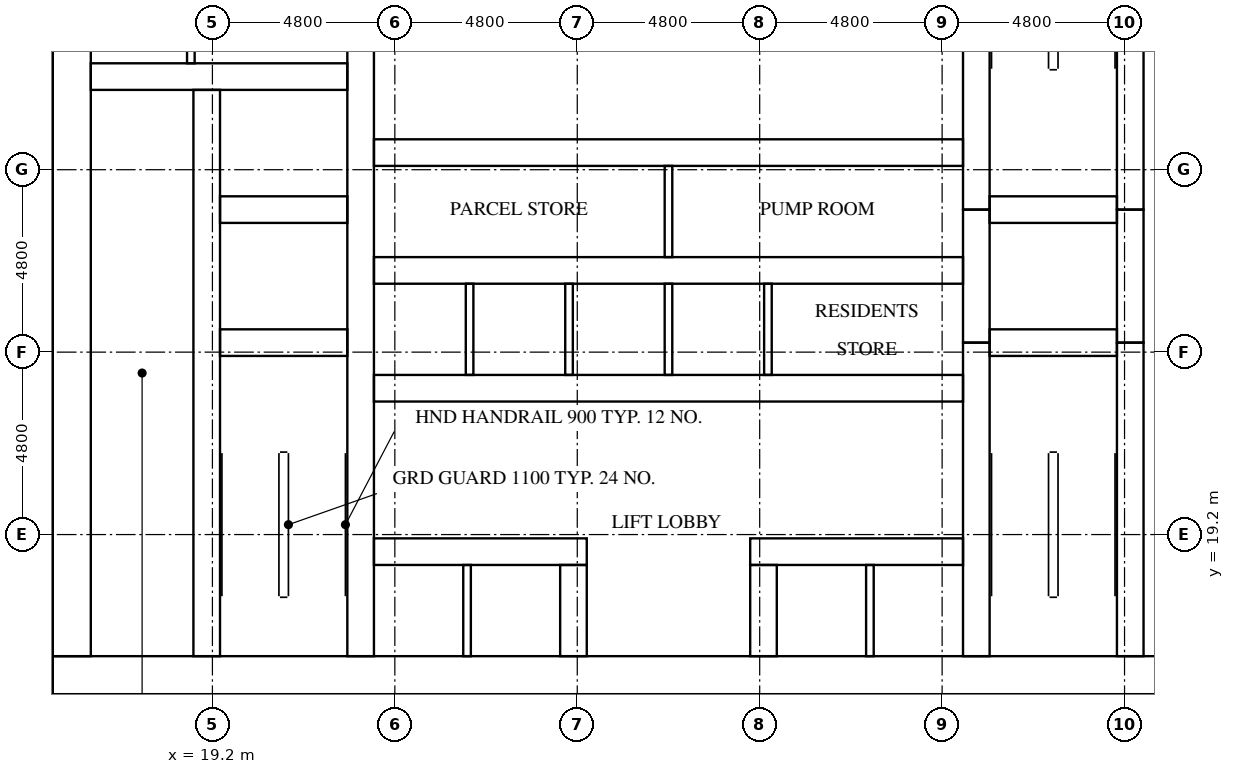
"""IFC4 building model, lengths in metres.
Left out: names, types, materials, properties, quantities, classifications, styles, units other than length and angle.
Written with IfcOpenShell. Run it as: python <this file> out.ifc"""

import sys

from ifc_helpers import new_model, si_unit, direction, frame, frame_2d, origin, place, context, subcontext, project, spatial, rectangle, extrude, element, fill, save


model = new_model("IFC4")
c1 = context("Model", 3, precision=1e-05, world=origin(), true_north=direction((0.0, 1.0)))
c2 = subcontext(c1, "Body", "Model", "MODEL_VIEW")
j1 = project(units=[si_unit("LENGTHUNIT", "METRE"), si_unit("PLANEANGLEUNIT", "RADIAN")], contexts=[c1])
p1 = place(None, origin())
s1 = spatial("IfcSite", under=j1, at=p1, CompositionType="ELEMENT")
p2 = place(p1, origin())
s2 = spatial("IfcBuilding", under=s1, at=p2, CompositionType="ELEMENT")
p3 = place(p2, frame((0.0, 0.0, 15.0)))
s3 = spatial("IfcBuildingStorey", under=s2, at=p3, CompositionType="ELEMENT", Elevation=15.0)
p4 = place(p3, frame((15.0, 15.5, 0.0), z_axis=(0.0, 0.0, 1.0), x_axis=(1.0, 0.0, 0.0)))
e1 = element("IfcWall", 1, at=p4, inside=s3, PredefinedType="SHEAR", context=c2, shape_type="SweptSolid", body=[
    extrude(rectangle(XDim=32.4, YDim=1.0, at=frame_2d((16.2, 0.0))), origin(), (0.0, 0.0, 1.0), 4.2),
])
p5 = place(p4, frame((15.3, 0.0, 0.0)))
e2 = element("IfcOpeningElement", 2, at=p5, cuts=e1, PredefinedType="OPENING", context=c2, shape_type="SweptSolid", body=[
    extrude(rectangle(XDim=1.8, YDim=2.1, at=frame_2d((0.9, 1.05))), frame((0.0, 0.51, 0.0), z_axis=(0.0, -1.0, 0.0), x_axis=(1.0, 0.0, 0.0)), (0.0, 0.0, 1.0), 1.02),
])
p6 = place(p3, frame((15.5, 16.0, 0.0), z_axis=(0.0, 0.0, 1.0), x_axis=(0.0, 1.0, 0.0)))
e3 = element("IfcWall", 3, at=p6, inside=s3, PredefinedType="SHEAR", context=c2, shape_type="SweptSolid", body=[
    extrude(rectangle(XDim=20.8, YDim=1.0, at=frame_2d((10.4, 0.0))), origin(), (0.0, 0.0, 1.0), 4.2),
])
p7 = place(p6, frame((4.76, 0.0, 0.0)))
e4 = element("IfcOpeningElement", 4, at=p7, cuts=e3, PredefinedType="OPENING", context=c2, shape_type="SweptSolid", body=[
    extrude(rectangle(XDim=1.2, YDim=2.1, at=frame_2d((0.6, 1.05))), frame((0.0, 0.51, 0.0), z_axis=(0.0, -1.0, 0.0), x_axis=(1.0, 0.0, 0.0)), (0.0, 0.0, 1.0), 1.02),
])
p8 = place(p3, frame((19.05, 16.0, 0.0), z_axis=(0.0, 0.0, 1.0), x_axis=(0.0, 1.0, 0.0)))
e5 = element("IfcWall", 5, at=p8, inside=s3, PredefinedType="SHEAR", context=c2, shape_type="SweptSolid", body=[
    extrude(rectangle(XDim=14.9, YDim=0.7, at=frame_2d((7.45, 0.0))), origin(), (0.0, 0.0, 1.0), 4.2),
])
p9 = place(p8, frame((9.45, 0.0, 0.0)))
e6 = element("IfcOpeningElement", 6, at=p9, cuts=e5, PredefinedType="OPENING", context=c2, shape_type="SweptSolid", body=[
    extrude(rectangle(XDim=1.1, YDim=2.1, at=frame_2d((0.55, 1.05))), frame((0.0, 0.36, 0.0), z_axis=(0.0, -1.0, 0.0), x_axis=(1.0, 0.0, 0.0)), (0.0, 0.0, 1.0), 0.72),
])
p10 = place(p8, frame((12.95, 0.0, 0.0)))
e7 = element("IfcOpeningElement", 7, at=p10, cuts=e5, PredefinedType="OPENING", context=c2, shape_type="SweptSolid", body=[
    extrude(rectangle(XDim=1.1, YDim=2.1, at=frame_2d((0.55, 1.05))), frame((0.0, 0.36, 0.0), z_axis=(0.0, -1.0, 0.0), x_axis=(1.0, 0.0, 0.0)), (0.0, 0.0, 1.0), 0.72),
])
p11 = place(p8, frame((0.2, 0.0, 0.0)))
e8 = element("IfcOpeningElement", 8, at=p11, cuts=e5, PredefinedType="OPENING", context=c2, shape_type="SweptSolid", body=[
    extrude(rectangle(XDim=1.2, YDim=2.1, at=frame_2d((0.6, 1.05))), frame((0.0, 0.36, 0.0), z_axis=(0.0, -1.0, 0.0), x_axis=(1.0, 0.0, 0.0)), (0.0, 0.0, 1.0), 0.72),
])
p12 = place(p3, frame((23.1, 16.0, 0.0), z_axis=(0.0, 0.0, 1.0), x_axis=(0.0, 1.0, 0.0)))
e9 = element("IfcWall", 9, at=p12, inside=s3, PredefinedType="SHEAR", context=c2, shape_type="SweptSolid", body=[
    extrude(rectangle(XDim=20.8, YDim=0.7, at=frame_2d((10.4, 0.0))), origin(), (0.0, 0.0, 1.0), 4.2),
])
p13 = place(p3, frame((39.3, 16.0, 0.0), z_axis=(0.0, 0.0, 1.0), x_axis=(0.0, 1.0, 0.0)))
e10 = element("IfcWall", 10, at=p13, inside=s3, PredefinedType="SHEAR", context=c2, shape_type="SweptSolid", body=[
    extrude(rectangle(XDim=8.25, YDim=0.7, at=frame_2d((4.125, 0.0))), origin(), (0.0, 0.0, 1.0), 4.2),
])
p14 = place(p3, frame((39.3, 24.25, 0.0), z_axis=(0.0, 0.0, 1.0), x_axis=(0.0, 1.0, 0.0)))
e11 = element("IfcWall", 11, at=p14, inside=s3, PredefinedType="SHEAR", context=c2, shape_type="SweptSolid", body=[
    extrude(rectangle(XDim=3.5, YDim=0.7, at=frame_2d((1.75, 0.0))), origin(), (0.0, 0.0, 1.0), 4.2),
])
p15 = place(p3, frame((39.3, 27.75, 0.0), z_axis=(0.0, 0.0, 1.0), x_axis=(0.0, 1.0, 0.0)))
e12 = element("IfcWall", 12, at=p15, inside=s3, PredefinedType="SHEAR", context=c2, shape_type="SweptSolid", body=[
    extrude(rectangle(XDim=9.05, YDim=0.7, at=frame_2d((4.525, 0.0))), origin(), (0.0, 0.0, 1.0), 4.2),
])
p16 = place(p3, frame((43.35, 16.0, 0.0), z_axis=(0.0, 0.0, 1.0), x_axis=(0.0, 1.0, 0.0)))
e13 = element("IfcWall", 13, at=p16, inside=s3, PredefinedType="SHEAR", context=c2, shape_type="SweptSolid", body=[
    extrude(rectangle(XDim=8.25, YDim=0.7, at=frame_2d((4.125, 0.0))), origin(), (0.0, 0.0, 1.0), 4.2),
])
p17 = place(p16, frame((0.2, 0.0, 0.0)))
e14 = element("IfcOpeningElement", 14, at=p17, cuts=e13, PredefinedType="OPENING", context=c2, shape_type="SweptSolid", body=[
    extrude(rectangle(XDim=1.2, YDim=2.1, at=frame_2d((0.6, 1.05))), frame((0.0, 0.36, 0.0), z_axis=(0.0, -1.0, 0.0), x_axis=(1.0, 0.0, 0.0)), (0.0, 0.0, 1.0), 0.72),
])
p18 = place(p3, frame((43.35, 24.25, 0.0), z_axis=(0.0, 0.0, 1.0), x_axis=(0.0, 1.0, 0.0)))
e15 = element("IfcWall", 15, at=p18, inside=s3, PredefinedType="SHEAR", context=c2, shape_type="SweptSolid", body=[
    extrude(rectangle(XDim=3.5, YDim=0.7, at=frame_2d((1.75, 0.0))), origin(), (0.0, 0.0, 1.0), 4.2),
])
p19 = place(p18, frame((1.2, 0.0, 0.0)))
e16 = element("IfcOpeningElement", 16, at=p19, cuts=e15, PredefinedType="OPENING", context=c2, shape_type="SweptSolid", body=[
    extrude(rectangle(XDim=1.1, YDim=2.1, at=frame_2d((0.55, 1.05))), frame((0.0, 0.36, 0.0), z_axis=(0.0, -1.0, 0.0), x_axis=(1.0, 0.0, 0.0)), (0.0, 0.0, 1.0), 0.72),
])
p20 = place(p3, frame((43.35, 27.75, 0.0), z_axis=(0.0, 0.0, 1.0), x_axis=(0.0, 1.0, 0.0)))
e17 = element("IfcWall", 17, at=p20, inside=s3, PredefinedType="SHEAR", context=c2, shape_type="SweptSolid", body=[
    extrude(rectangle(XDim=9.05, YDim=0.7, at=frame_2d((4.525, 0.0))), origin(), (0.0, 0.0, 1.0), 4.2),
])
p21 = place(p20, frame((7.65, 0.0, 0.0)))
e18 = element("IfcOpeningElement", 18, at=p21, cuts=e17, PredefinedType="OPENING", context=c2, shape_type="SweptSolid", body=[
    extrude(rectangle(XDim=1.2, YDim=2.1, at=frame_2d((0.6, 1.05))), frame((0.0, 0.36, 0.0), z_axis=(0.0, -1.0, 0.0), x_axis=(1.0, 0.0, 0.0)), (0.0, 0.0, 1.0), 0.72),
])
for number, where, z_axis, x_axis in (
    (19, (19.4, 24.25, 0.0), (0.0, 0.0, 1.0), (1.0, 0.0, 0.0)),
    (20, (19.4, 27.75, 0.0), (0.0, 0.0, 1.0), (1.0, 0.0, 0.0)),
):
    element("IfcWall", number, at=place(p3, frame(where, z_axis=z_axis, x_axis=x_axis)), inside=s3, PredefinedType="SHEAR", context=c2, shape_type="SweptSolid", body=[
        extrude(rectangle(XDim=3.35, YDim=0.7, at=frame_2d((1.675, 0.0))), origin(), (0.0, 0.0, 1.0), 4.2),
    ])
p22 = place(p3, frame((16.0, 31.25, 0.0), z_axis=(0.0, 0.0, 1.0), x_axis=(1.0, 0.0, 0.0)))
e21 = element("IfcWall", 21, at=p22, inside=s3, PredefinedType="SHEAR", context=c2, shape_type="SweptSolid", body=[
    extrude(rectangle(XDim=6.75, YDim=0.7, at=frame_2d((3.375, 0.0))), origin(), (0.0, 0.0, 1.0), 4.2),
])
for number, where, z_axis, x_axis in (
    (22, (39.65, 24.25, 0.0), (0.0, 0.0, 1.0), (1.0, 0.0, 0.0)),
    (23, (39.65, 27.75, 0.0), (0.0, 0.0, 1.0), (1.0, 0.0, 0.0)),
):
    element("IfcWall", number, at=place(p3, frame(where, z_axis=z_axis, x_axis=x_axis)), inside=s3, PredefinedType="SHEAR", context=c2, shape_type="SweptSolid", body=[
        extrude(rectangle(XDim=3.35, YDim=0.7, at=frame_2d((1.675, 0.0))), origin(), (0.0, 0.0, 1.0), 4.2),
    ])
p23 = place(p3, frame((23.45, 18.75, 0.0), z_axis=(0.0, 0.0, 1.0), x_axis=(1.0, 0.0, 0.0)))
e24 = element("IfcWall", 24, at=p23, inside=s3, PredefinedType="SHEAR", context=c2, shape_type="SweptSolid", body=[
    extrude(rectangle(XDim=5.6, YDim=0.7, at=frame_2d((2.8, 0.0))), origin(), (0.0, 0.0, 1.0), 4.2),
])
p24 = place(p23, frame((0.625, 0.0, 0.0)))
e25 = element("IfcOpeningElement", 25, at=p24, cuts=e24, PredefinedType="OPENING", context=c2, shape_type="SweptSolid", body=[
    extrude(rectangle(XDim=1.1, YDim=2.1, at=frame_2d((0.55, 1.05))), frame((0.0, 0.36, 0.0), z_axis=(0.0, -1.0, 0.0), x_axis=(1.0, 0.0, 0.0)), (0.0, 0.0, 1.0), 0.72),
])
p25 = place(p23, frame((3.175, 0.0, 0.0)))
e26 = element("IfcOpeningElement", 26, at=p25, cuts=e24, PredefinedType="OPENING", context=c2, shape_type="SweptSolid", body=[
    extrude(rectangle(XDim=1.1, YDim=2.1, at=frame_2d((0.55, 1.05))), frame((0.0, 0.36, 0.0), z_axis=(0.0, -1.0, 0.0), x_axis=(1.0, 0.0, 0.0)), (0.0, 0.0, 1.0), 0.72),
])
p26 = place(p3, frame((33.35, 18.75, 0.0), z_axis=(0.0, 0.0, 1.0), x_axis=(1.0, 0.0, 0.0)))
e27 = element("IfcWall", 27, at=p26, inside=s3, PredefinedType="SHEAR", context=c2, shape_type="SweptSolid", body=[
    extrude(rectangle(XDim=5.6, YDim=0.7, at=frame_2d((2.8, 0.0))), origin(), (0.0, 0.0, 1.0), 4.2),
])
p27 = place(p26, frame((1.325, 0.0, 0.0)))
e28 = element("IfcOpeningElement", 28, at=p27, cuts=e27, PredefinedType="OPENING", context=c2, shape_type="SweptSolid", body=[
    extrude(rectangle(XDim=1.1, YDim=2.1, at=frame_2d((0.55, 1.05))), frame((0.0, 0.36, 0.0), z_axis=(0.0, -1.0, 0.0), x_axis=(1.0, 0.0, 0.0)), (0.0, 0.0, 1.0), 0.72),
])
p28 = place(p26, frame((3.875, 0.0, 0.0)))
e29 = element("IfcOpeningElement", 29, at=p28, cuts=e27, PredefinedType="OPENING", context=c2, shape_type="SweptSolid", body=[
    extrude(rectangle(XDim=1.1, YDim=2.1, at=frame_2d((0.55, 1.05))), frame((0.0, 0.36, 0.0), z_axis=(0.0, -1.0, 0.0), x_axis=(1.0, 0.0, 0.0)), (0.0, 0.0, 1.0), 0.72),
])
p29 = place(p3, frame((23.45, 23.05, 0.0), z_axis=(0.0, 0.0, 1.0), x_axis=(1.0, 0.0, 0.0)))
e30 = element("IfcWall", 30, at=p29, inside=s3, PredefinedType="SHEAR", context=c2, shape_type="SweptSolid", body=[
    extrude(rectangle(XDim=15.5, YDim=0.7, at=frame_2d((7.75, 0.0))), origin(), (0.0, 0.0, 1.0), 4.2),
])
p30 = place(p29, frame((0.658, 0.0, 0.0)))
e31 = element("IfcOpeningElement", 31, at=p30, cuts=e30, PredefinedType="OPENING", context=c2, shape_type="SweptSolid", body=[
    extrude(rectangle(XDim=1.1, YDim=2.1, at=frame_2d((0.55, 1.05))), frame((0.0, 0.36, 0.0), z_axis=(0.0, -1.0, 0.0), x_axis=(1.0, 0.0, 0.0)), (0.0, 0.0, 1.0), 0.72),
])
p31 = place(p29, frame((3.275, 0.0, 0.0)))
e32 = element("IfcOpeningElement", 32, at=p31, cuts=e30, PredefinedType="OPENING", context=c2, shape_type="SweptSolid", body=[
    extrude(rectangle(XDim=1.1, YDim=2.1, at=frame_2d((0.55, 1.05))), frame((0.0, 0.36, 0.0), z_axis=(0.0, -1.0, 0.0), x_axis=(1.0, 0.0, 0.0)), (0.0, 0.0, 1.0), 0.72),
])
p32 = place(p29, frame((12.483, 0.0, 0.0)))
e33 = element("IfcOpeningElement", 33, at=p32, cuts=e30, PredefinedType="OPENING", context=c2, shape_type="SweptSolid", body=[
    extrude(rectangle(XDim=1.0, YDim=2.1, at=frame_2d((0.5, 1.05))), frame((0.0, 0.36, 0.0), z_axis=(0.0, -1.0, 0.0), x_axis=(1.0, 0.0, 0.0)), (0.0, 0.0, 1.0), 0.72),
])
p33 = place(p3, frame((23.45, 26.15, 0.0), z_axis=(0.0, 0.0, 1.0), x_axis=(1.0, 0.0, 0.0)))
e34 = element("IfcWall", 34, at=p33, inside=s3, PredefinedType="SHEAR", context=c2, shape_type="SweptSolid", body=[
    extrude(rectangle(XDim=15.5, YDim=0.7, at=frame_2d((7.75, 0.0))), origin(), (0.0, 0.0, 1.0), 4.2),
])
p34 = place(p3, frame((23.45, 29.25, 0.0), z_axis=(0.0, 0.0, 1.0), x_axis=(1.0, 0.0, 0.0)))
e35 = element("IfcWall", 35, at=p34, inside=s3, PredefinedType="SHEAR", context=c2, shape_type="SweptSolid", body=[
    extrude(rectangle(XDim=15.5, YDim=0.7, at=frame_2d((7.75, 0.0))), origin(), (0.0, 0.0, 1.0), 4.2),
])
p35 = place(p34, frame((3.325, 0.0, 0.0)))
e36 = element("IfcOpeningElement", 36, at=p35, cuts=e35, PredefinedType="OPENING", context=c2, shape_type="SweptSolid", body=[
    extrude(rectangle(XDim=1.0, YDim=2.1, at=frame_2d((0.5, 1.05))), frame((0.0, 0.36, 0.0), z_axis=(0.0, -1.0, 0.0), x_axis=(1.0, 0.0, 0.0)), (0.0, 0.0, 1.0), 0.72),
])
p36 = place(p34, frame((11.175, 0.0, 0.0)))
e37 = element("IfcOpeningElement", 37, at=p36, cuts=e35, PredefinedType="OPENING", context=c2, shape_type="SweptSolid", body=[
    extrude(rectangle(XDim=1.0, YDim=2.1, at=frame_2d((0.5, 1.05))), frame((0.0, 0.36, 0.0), z_axis=(0.0, -1.0, 0.0), x_axis=(1.0, 0.0, 0.0)), (0.0, 0.0, 1.0), 0.72),
])
for number, where, z_axis, x_axis in (
    (38, (28.7, 16.0, 0.0), (0.0, 0.0, 1.0), (0.0, 1.0, 0.0)),
    (39, (33.7, 16.0, 0.0), (0.0, 0.0, 1.0), (0.0, 1.0, 0.0)),
):
    element("IfcWall", number, at=place(p3, frame(where, z_axis=z_axis, x_axis=x_axis)), inside=s3, PredefinedType="SHEAR", context=c2, shape_type="SweptSolid", body=[
        extrude(rectangle(XDim=2.4, YDim=0.7, at=frame_2d((1.2, 0.0))), origin(), (0.0, 0.0, 1.0), 4.2),
    ])
for number, where, z_axis, x_axis in (
    (40, (25.967, 23.4, 0.0), (0.0, 0.0, 1.0), (0.0, 1.0, 0.0)),
    (41, (28.583, 23.4, 0.0), (0.0, 0.0, 1.0), (0.0, 1.0, 0.0)),
    (42, (31.2, 23.4, 0.0), (0.0, 0.0, 1.0), (0.0, 1.0, 0.0)),
    (43, (33.817, 23.4, 0.0), (0.0, 0.0, 1.0), (0.0, 1.0, 0.0)),
):
    element("IfcWall", number, at=place(p3, frame(where, z_axis=z_axis, x_axis=x_axis)), inside=s3, PredefinedType="SOLIDWALL", context=c2, shape_type="SweptSolid", body=[
        extrude(rectangle(XDim=2.4, YDim=0.2, at=frame_2d((1.2, 0.0))), origin(), (0.0, 0.0, 1.0), 4.2),
    ])
for number, where, z_axis, x_axis in (
    (44, (25.9, 16.0, 0.0), (0.0, 0.0, 1.0), (0.0, 1.0, 0.0)),
    (45, (36.5, 16.0, 0.0), (0.0, 0.0, 1.0), (0.0, 1.0, 0.0)),
):
    element("IfcWall", number, at=place(p3, frame(where, z_axis=z_axis, x_axis=x_axis)), inside=s3, PredefinedType="SOLIDWALL", context=c2, shape_type="SweptSolid", body=[
        extrude(rectangle(XDim=2.4, YDim=0.2, at=frame_2d((1.2, 0.0))), origin(), (0.0, 0.0, 1.0), 4.2),
    ])
p37 = place(p3, frame((18.633, 31.6, 0.0), z_axis=(0.0, 0.0, 1.0), x_axis=(0.0, 1.0, 0.0)))
e46 = element("IfcWall", 46, at=p37, inside=s3, PredefinedType="PARTITIONING", context=c2, shape_type="SweptSolid", body=[
    extrude(rectangle(XDim=5.2, YDim=0.2, at=frame_2d((2.6, 0.0))), origin(), (0.0, 0.0, 1.0), 4.2),
])
p38 = place(p3, frame((31.2, 26.5, 0.0), z_axis=(0.0, 0.0, 1.0), x_axis=(0.0, 1.0, 0.0)))
e47 = element("IfcWall", 47, at=p38, inside=s3, PredefinedType="PARTITIONING", context=c2, shape_type="SweptSolid", body=[
    extrude(rectangle(XDim=2.4, YDim=0.2, at=frame_2d((1.2, 0.0))), origin(), (0.0, 0.0, 1.0), 4.2),
])
p39 = place(p24, origin())
e48 = element("IfcDoor", 48, at=p39, inside=s3, OperationType="DOUBLE_DOOR_SLIDING", PredefinedType="DOOR", context=c2, shape_type="SweptSolid", body=[
    extrude(rectangle(XDim=1.1, YDim=2.1, at=frame_2d((0.55, 1.05))), frame((0.0, 0.025, 0.0), z_axis=(0.0, -1.0, 0.0), x_axis=(1.0, 0.0, 0.0)), (0.0, 0.0, 1.0), 0.05),
])
fill(e25, e48)
p40 = place(p25, origin())
e49 = element("IfcDoor", 49, at=p40, inside=s3, OperationType="DOUBLE_DOOR_SLIDING", PredefinedType="DOOR", context=c2, shape_type="SweptSolid", body=[
    extrude(rectangle(XDim=1.1, YDim=2.1, at=frame_2d((0.55, 1.05))), frame((0.0, 0.025, 0.0), z_axis=(0.0, -1.0, 0.0), x_axis=(1.0, 0.0, 0.0)), (0.0, 0.0, 1.0), 0.05),
])
fill(e26, e49)
p41 = place(p27, origin())
e50 = element("IfcDoor", 50, at=p41, inside=s3, OperationType="DOUBLE_DOOR_SLIDING", PredefinedType="DOOR", context=c2, shape_type="SweptSolid", body=[
    extrude(rectangle(XDim=1.1, YDim=2.1, at=frame_2d((0.55, 1.05))), frame((0.0, 0.025, 0.0), z_axis=(0.0, -1.0, 0.0), x_axis=(1.0, 0.0, 0.0)), (0.0, 0.0, 1.0), 0.05),
])
fill(e28, e50)
p42 = place(p28, origin())
e51 = element("IfcDoor", 51, at=p42, inside=s3, OperationType="DOUBLE_DOOR_SLIDING", PredefinedType="DOOR", context=c2, shape_type="SweptSolid", body=[
    extrude(rectangle(XDim=1.1, YDim=2.1, at=frame_2d((0.55, 1.05))), frame((0.0, 0.025, 0.0), z_axis=(0.0, -1.0, 0.0), x_axis=(1.0, 0.0, 0.0)), (0.0, 0.0, 1.0), 0.05),
])
fill(e29, e51)
p43 = place(p30, origin())
e52 = element("IfcDoor", 52, at=p43, inside=s3, OperationType="DOUBLE_DOOR_SLIDING", PredefinedType="DOOR", context=c2, shape_type="SweptSolid", body=[
    extrude(rectangle(XDim=1.1, YDim=2.1, at=frame_2d((0.55, 1.05))), frame((0.0, 0.025, 0.0), z_axis=(0.0, -1.0, 0.0), x_axis=(1.0, 0.0, 0.0)), (0.0, 0.0, 1.0), 0.05),
])
fill(e31, e52)
p44 = place(p31, origin())
e53 = element("IfcDoor", 53, at=p44, inside=s3, OperationType="DOUBLE_DOOR_SLIDING", PredefinedType="DOOR", context=c2, shape_type="SweptSolid", body=[
    extrude(rectangle(XDim=1.1, YDim=2.1, at=frame_2d((0.55, 1.05))), frame((0.0, 0.025, 0.0), z_axis=(0.0, -1.0, 0.0), x_axis=(1.0, 0.0, 0.0)), (0.0, 0.0, 1.0), 0.05),
])
fill(e32, e53)
p45 = place(p9, origin())
e54 = element("IfcDoor", 54, at=p45, inside=s3, OperationType="DOUBLE_DOOR_SLIDING", PredefinedType="DOOR", context=c2, shape_type="SweptSolid", body=[
    extrude(rectangle(XDim=1.1, YDim=2.1, at=frame_2d((0.55, 1.05))), frame((0.0, 0.025, 0.0), z_axis=(0.0, -1.0, 0.0), x_axis=(1.0, 0.0, 0.0)), (0.0, 0.0, 1.0), 0.05),
])
fill(e6, e54)
p46 = place(p10, origin())
e55 = element("IfcDoor", 55, at=p46, inside=s3, OperationType="DOUBLE_DOOR_SLIDING", PredefinedType="DOOR", context=c2, shape_type="SweptSolid", body=[
    extrude(rectangle(XDim=1.1, YDim=2.1, at=frame_2d((0.55, 1.05))), frame((0.0, 0.025, 0.0), z_axis=(0.0, -1.0, 0.0), x_axis=(1.0, 0.0, 0.0)), (0.0, 0.0, 1.0), 0.05),
])
fill(e7, e55)
p47 = place(p19, origin())
e56 = element("IfcDoor", 56, at=p47, inside=s3, OperationType="DOUBLE_DOOR_SLIDING", PredefinedType="DOOR", context=c2, shape_type="SweptSolid", body=[
    extrude(rectangle(XDim=1.1, YDim=2.1, at=frame_2d((0.55, 1.05))), frame((0.0, 0.025, 0.0), z_axis=(0.0, -1.0, 0.0), x_axis=(1.0, 0.0, 0.0)), (0.0, 0.0, 1.0), 0.05),
])
fill(e16, e56)
p48 = place(p11, frame((1.2, 0.0, 0.0), z_axis=(0.0, 0.0, 1.0), x_axis=(-1.0, 0.0, 0.0)))
e57 = element("IfcDoor", 57, at=p48, inside=s3, OperationType="SINGLE_SWING_LEFT", PredefinedType="DOOR", context=c2, shape_type="SweptSolid", body=[
    extrude(rectangle(XDim=1.2, YDim=2.1, at=frame_2d((0.6, 1.05))), frame((0.0, 0.025, 0.0), z_axis=(0.0, -1.0, 0.0), x_axis=(1.0, 0.0, 0.0)), (0.0, 0.0, 1.0), 0.05),
])
fill(e8, e57)
p49 = place(p17, origin())
e58 = element("IfcDoor", 58, at=p49, inside=s3, OperationType="SINGLE_SWING_RIGHT", PredefinedType="DOOR", context=c2, shape_type="SweptSolid", body=[
    extrude(rectangle(XDim=1.2, YDim=2.1, at=frame_2d((0.6, 1.05))), frame((0.0, 0.025, 0.0), z_axis=(0.0, -1.0, 0.0), x_axis=(1.0, 0.0, 0.0)), (0.0, 0.0, 1.0), 0.05),
])
fill(e14, e58)
p50 = place(p5, frame((1.8, 0.0, 0.0), z_axis=(0.0, 0.0, 1.0), x_axis=(-1.0, 0.0, 0.0)))
e59 = element("IfcDoor", 59, at=p50, inside=s3, OperationType="DOUBLE_DOOR_SINGLE_SWING", PredefinedType="DOOR", context=c2, shape_type="SweptSolid", body=[
    extrude(rectangle(XDim=1.8, YDim=2.1, at=frame_2d((0.9, 1.05))), frame((0.0, 0.025, 0.0), z_axis=(0.0, -1.0, 0.0), x_axis=(1.0, 0.0, 0.0)), (0.0, 0.0, 1.0), 0.05),
])
fill(e2, e59)
p51 = place(p7, frame((1.2, 0.0, 0.0), z_axis=(0.0, 0.0, 1.0), x_axis=(-1.0, 0.0, 0.0)))
e60 = element("IfcDoor", 60, at=p51, inside=s3, OperationType="SINGLE_SWING_RIGHT", PredefinedType="DOOR", context=c2, shape_type="SweptSolid", body=[
    extrude(rectangle(XDim=1.2, YDim=2.1, at=frame_2d((0.6, 1.05))), frame((0.0, 0.025, 0.0), z_axis=(0.0, -1.0, 0.0), x_axis=(1.0, 0.0, 0.0)), (0.0, 0.0, 1.0), 0.05),
])
fill(e4, e60)
p52 = place(p32, frame((1.0, 0.0, 0.0), z_axis=(0.0, 0.0, 1.0), x_axis=(-1.0, 0.0, 0.0)))
e61 = element("IfcDoor", 61, at=p52, inside=s3, OperationType="SINGLE_SWING_RIGHT", PredefinedType="DOOR", context=c2, shape_type="SweptSolid", body=[
    extrude(rectangle(XDim=1.0, YDim=2.1, at=frame_2d((0.5, 1.05))), frame((0.0, 0.025, 0.0), z_axis=(0.0, -1.0, 0.0), x_axis=(1.0, 0.0, 0.0)), (0.0, 0.0, 1.0), 0.05),
])
fill(e33, e61)
p53 = place(p35, origin())
e62 = element("IfcDoor", 62, at=p53, inside=s3, OperationType="SINGLE_SWING_LEFT", PredefinedType="DOOR", context=c2, shape_type="SweptSolid", body=[
    extrude(rectangle(XDim=1.0, YDim=2.1, at=frame_2d((0.5, 1.05))), frame((0.0, 0.025, 0.0), z_axis=(0.0, -1.0, 0.0), x_axis=(1.0, 0.0, 0.0)), (0.0, 0.0, 1.0), 0.05),
])
fill(e36, e62)
p54 = place(p36, origin())
e63 = element("IfcDoor", 63, at=p54, inside=s3, OperationType="SINGLE_SWING_RIGHT", PredefinedType="DOOR", context=c2, shape_type="SweptSolid", body=[
    extrude(rectangle(XDim=1.0, YDim=2.1, at=frame_2d((0.5, 1.05))), frame((0.0, 0.025, 0.0), z_axis=(0.0, -1.0, 0.0), x_axis=(1.0, 0.0, 0.0)), (0.0, 0.0, 1.0), 0.05),
])
fill(e37, e63)
save(model, sys.argv[1])
